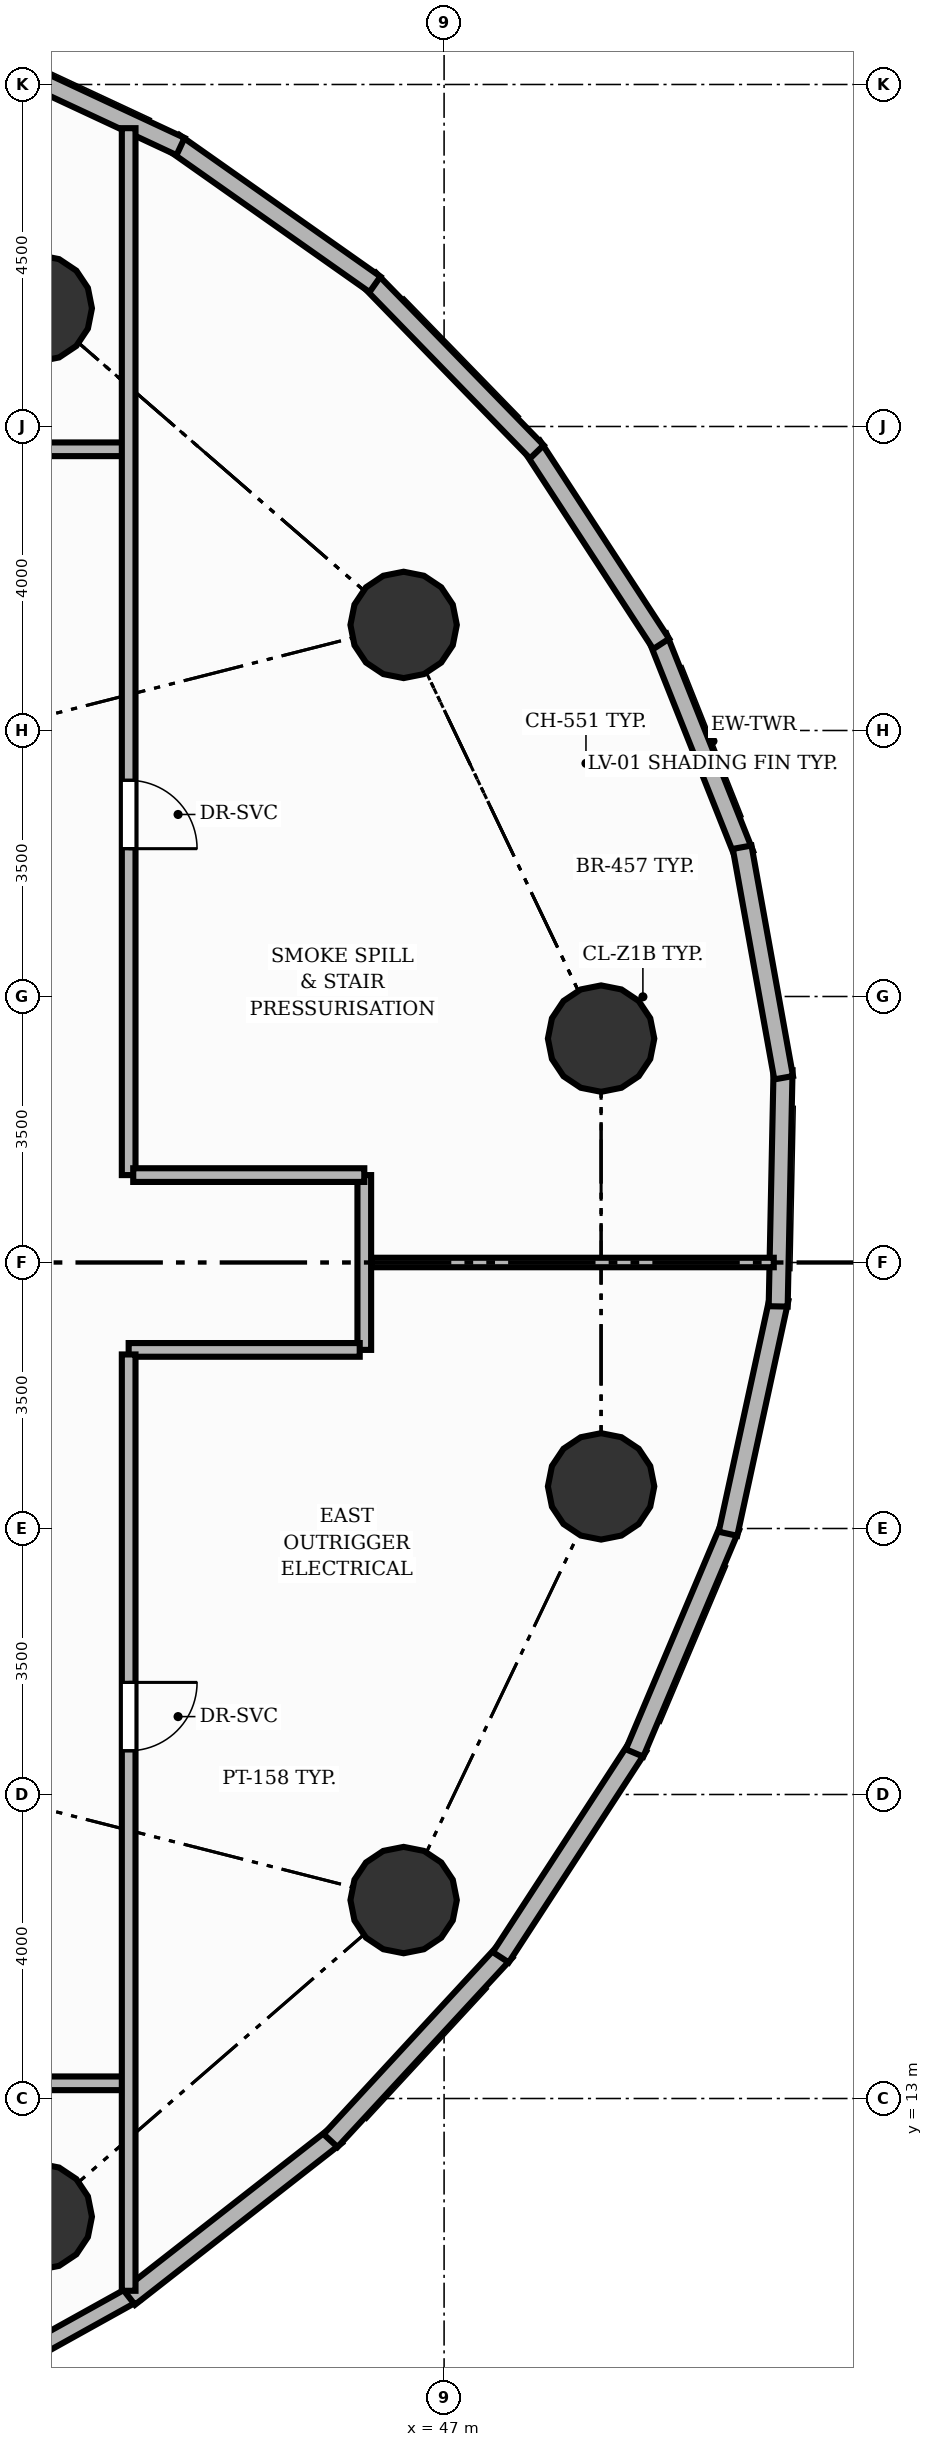
"""IFC4 building model, lengths in metres.
Left out: names, types, materials, properties, quantities, classifications, styles, units other than length and angle.
Written with IfcOpenShell. Run it as: python <this file> out.ifc"""

import sys

from ifc_helpers import new_model, si_unit, direction, frame, frame_2d, origin, origin_2d, place, context, subcontext, project, spatial, rectangle, circle, extrude, element, fill, save


model = new_model("IFC4")
c1 = context("Model", 3, precision=1e-05, world=origin(), true_north=direction((0.0, 1.0)))
c2 = subcontext(c1, "Body", "Model", "MODEL_VIEW")
j1 = project(units=[si_unit("LENGTHUNIT", "METRE"), si_unit("PLANEANGLEUNIT", "RADIAN")], contexts=[c1])
p1 = place(None, origin())
s1 = spatial("IfcSite", under=j1, at=p1, CompositionType="ELEMENT")
p2 = place(p1, origin())
s2 = spatial("IfcBuilding", under=s1, at=p2, CompositionType="ELEMENT")
p3 = place(p2, frame((0.0, 0.0, 66.4)))
s3 = spatial("IfcBuildingStorey", under=s2, at=p3, CompositionType="ELEMENT", Elevation=66.4)
for number, where, z_axis, x_axis in (
    (1, (49.066, 26.946, 0.0), (0.0, 0.0, 1.0), (1.0, 0.0, 0.0)),
    (2, (46.468, 32.389, 0.0), (0.0, 0.0, 1.0), (1.0, 0.0, 0.0)),
    (3, (41.667, 36.555, 0.0), (0.0, 0.0, 1.0), (1.0, 0.0, 0.0)),
    (4, (41.667, 11.445, 0.0), (0.0, 0.0, 1.0), (1.0, 0.0, 0.0)),
    (5, (46.468, 15.611, 0.0), (0.0, 0.0, 1.0), (1.0, 0.0, 0.0)),
    (6, (49.066, 21.054, 0.0), (0.0, 0.0, 1.0), (1.0, 0.0, 0.0)),
):
    element("IfcColumn", number, at=place(p3, frame(where, z_axis=z_axis, x_axis=x_axis)), inside=s3, PredefinedType="COLUMN", context=c2, shape_type="SweptSolid", body=[
        extrude(circle(Radius=0.7, at=origin_2d()), origin(), (0.0, 0.0, 1.0), 4.48),
    ])
p4 = place(p3, frame((49.809, 32.23, 0.0), z_axis=(0.0, 0.0, 1.0), x_axis=(0.369942469499, -0.929054664302, 0.0)))
e7 = element("IfcWall", 7, at=p4, inside=s3, PredefinedType="SOLIDWALL", context=c2, shape_type="SweptSolid", body=[
    extrude(rectangle(XDim=3.082, YDim=0.25, at=frame_2d((1.541, 0.0))), origin(), (0.0, 0.0, 1.0), 4.24),
])
p5 = place(p3, frame((48.157, 34.745, 0.0), z_axis=(0.0, 0.0, 1.0), x_axis=(0.546121725676, -0.837705831868, 0.0)))
e8 = element("IfcWall", 8, at=p5, inside=s3, PredefinedType="SOLIDWALL", context=c2, shape_type="SweptSolid", body=[
    extrude(rectangle(XDim=3.111, YDim=0.25, at=frame_2d((1.555, 0.0))), origin(), (0.0, 0.0, 1.0), 4.24),
])
p6 = place(p3, frame((46.015, 36.935, 0.0), z_axis=(0.0, 0.0, 1.0), x_axis=(0.697004563812, -0.717066690082, 0.0)))
e9 = element("IfcWall", 9, at=p6, inside=s3, PredefinedType="SOLIDWALL", context=c2, shape_type="SweptSolid", body=[
    extrude(rectangle(XDim=3.164, YDim=0.25, at=frame_2d((1.582, 0.0))), origin(), (0.0, 0.0, 1.0), 4.24),
])
p7 = place(p3, frame((43.447, 38.733, 0.0), z_axis=(0.0, 0.0, 1.0), x_axis=(0.817429926176, -0.576028051219, 0.0)))
e10 = element("IfcWall", 10, at=p7, inside=s3, PredefinedType="SOLIDWALL", context=c2, shape_type="SweptSolid", body=[
    extrude(rectangle(XDim=3.234, YDim=0.25, at=frame_2d((1.617, 0.0))), origin(), (0.0, 0.0, 1.0), 4.24),
])
p8 = place(p3, frame((40.531, 40.085, 0.0), z_axis=(0.0, 0.0, 1.0), x_axis=(0.906173725202, -0.422905639301, 0.0)))
e11 = element("IfcWall", 11, at=p8, inside=s3, PredefinedType="SOLIDWALL", context=c2, shape_type="SweptSolid", body=[
    extrude(rectangle(XDim=3.312, YDim=0.25, at=frame_2d((1.656, 0.0))), origin(), (0.0, 0.0, 1.0), 4.24),
])
p9 = place(p3, frame((42.937, 10.438, 0.0), z_axis=(0.0, 0.0, 1.0), x_axis=(-0.874075073274, -0.485790866815, 0.0)))
e12 = element("IfcWall", 12, at=p9, inside=s3, PredefinedType="PARAPET", context=c2, shape_type="SweptSolid", body=[
    extrude(rectangle(XDim=3.503, YDim=0.22, at=frame_2d((1.751, 0.0))), origin(), (0.0, 0.0, 1.0), 1.15),
])
p10 = place(p3, frame((45.578, 12.512, 0.0), z_axis=(0.0, 0.0, 1.0), x_axis=(-0.787892573834, -0.615812708619, 0.0)))
e13 = element("IfcWall", 13, at=p10, inside=s3, PredefinedType="SOLIDWALL", context=c2, shape_type="SweptSolid", body=[
    extrude(rectangle(XDim=3.455, YDim=0.25, at=frame_2d((1.727, 0.0))), origin(), (0.0, 0.0, 1.0), 4.24),
])
p11 = place(p3, frame((47.806, 14.936, 0.0), z_axis=(0.0, 0.0, 1.0), x_axis=(-0.678528400374, -0.734574169085, 0.0)))
e14 = element("IfcWall", 14, at=p11, inside=s3, PredefinedType="SOLIDWALL", context=c2, shape_type="SweptSolid", body=[
    extrude(rectangle(XDim=3.389, YDim=0.25, at=frame_2d((1.695, 0.0))), origin(), (0.0, 0.0, 1.0), 4.24),
])
p12 = place(p3, frame((49.552, 17.634, 0.0), z_axis=(0.0, 0.0, 1.0), x_axis=(-0.545464926113, -0.838133649474, 0.0)))
e15 = element("IfcWall", 15, at=p12, inside=s3, PredefinedType="SOLIDWALL", context=c2, shape_type="SweptSolid", body=[
    extrude(rectangle(XDim=3.312, YDim=0.25, at=frame_2d((1.656, 0.0))), origin(), (0.0, 0.0, 1.0), 4.24),
])
p13 = place(p3, frame((50.765, 20.526, 0.0), z_axis=(0.0, 0.0, 1.0), x_axis=(-0.389332172351, -0.921097421326, 0.0)))
e16 = element("IfcWall", 16, at=p13, inside=s3, PredefinedType="SOLIDWALL", context=c2, shape_type="SweptSolid", body=[
    extrude(rectangle(XDim=3.234, YDim=0.25, at=frame_2d((1.617, 0.0))), origin(), (0.0, 0.0, 1.0), 4.24),
])
p14 = place(p3, frame((51.407, 23.522, 0.0), z_axis=(0.0, 0.0, 1.0), x_axis=(-0.212426440862, -0.977177060324, 0.0)))
e17 = element("IfcWall", 17, at=p14, inside=s3, PredefinedType="SOLIDWALL", context=c2, shape_type="SweptSolid", body=[
    extrude(rectangle(XDim=3.164, YDim=0.25, at=frame_2d((1.582, 0.0))), origin(), (0.0, 0.0, 1.0), 4.24),
])
p15 = place(p3, frame((51.46, 26.532, 0.0), z_axis=(0.0, 0.0, 1.0), x_axis=(-0.020642483929, -0.999786921227, 0.0)))
e18 = element("IfcWall", 18, at=p15, inside=s3, PredefinedType="SOLIDWALL", context=c2, shape_type="SweptSolid", body=[
    extrude(rectangle(XDim=3.111, YDim=0.25, at=frame_2d((1.555, 0.0))), origin(), (0.0, 0.0, 1.0), 4.24),
])
p16 = place(p3, frame((50.921, 29.464, 0.0), z_axis=(0.0, 0.0, 1.0), x_axis=(0.17721899044, -0.984171443107, 0.0)))
e19 = element("IfcWall", 19, at=p16, inside=s3, PredefinedType="SOLIDWALL", context=c2, shape_type="SweptSolid", body=[
    extrude(rectangle(XDim=3.082, YDim=0.25, at=frame_2d((1.541, 0.0))), origin(), (0.0, 0.0, 1.0), 4.24),
])
p17 = place(p3, frame((42.85, 13.2, 0.0), z_axis=(0.0, 0.0, 1.0), x_axis=(-1.0, 0.0, 0.0)))
e20 = element("IfcWall", 20, at=p17, inside=s3, PredefinedType="PARTITIONING", context=c2, shape_type="SweptSolid", body=[
    extrude(rectangle(XDim=21.7, YDim=0.18, at=frame_2d((10.85, 0.0))), origin(), (0.0, 0.0, 1.0), 4.235),
])
p18 = place(p17, frame((10.4, 0.0, 0.0)))
e21 = element("IfcOpeningElement", 21, at=p18, cuts=e20, PredefinedType="OPENING", context=c2, shape_type="SweptSolid", body=[
    extrude(rectangle(XDim=0.9, YDim=2.1, at=frame_2d((0.45, 1.05))), frame((0.0, 0.1, 0.0), z_axis=(0.0, -1.0, 0.0), x_axis=(1.0, 0.0, 0.0)), (0.0, 0.0, 1.0), 0.2),
])
p19 = place(p3, frame((21.15, 34.7, 0.0), z_axis=(0.0, 0.0, 1.0), x_axis=(1.0, 0.0, 0.0)))
e22 = element("IfcWall", 22, at=p19, inside=s3, PredefinedType="PARTITIONING", context=c2, shape_type="SweptSolid", body=[
    extrude(rectangle(XDim=21.7, YDim=0.18, at=frame_2d((10.85, 0.0))), origin(), (0.0, 0.0, 1.0), 4.235),
])
p20 = place(p19, frame((15.715, 0.0, 0.0)))
e23 = element("IfcOpeningElement", 23, at=p20, cuts=e22, PredefinedType="OPENING", context=c2, shape_type="SweptSolid", body=[
    extrude(rectangle(XDim=0.9, YDim=2.1, at=frame_2d((0.45, 1.05))), frame((0.0, 0.1, 0.0), z_axis=(0.0, -1.0, 0.0), x_axis=(1.0, 0.0, 0.0)), (0.0, 0.0, 1.0), 0.2),
])
p21 = place(p19, frame((8.4, 0.0, 0.0)))
e24 = element("IfcOpeningElement", 24, at=p21, cuts=e22, PredefinedType="OPENING", context=c2, shape_type="SweptSolid", body=[
    extrude(rectangle(XDim=0.9, YDim=2.1, at=frame_2d((0.45, 1.05))), frame((0.0, 0.1, 0.0), z_axis=(0.0, -1.0, 0.0), x_axis=(1.0, 0.0, 0.0)), (0.0, 0.0, 1.0), 0.2),
])
p22 = place(p19, frame((3.085, 0.0, 0.0)))
e25 = element("IfcOpeningElement", 25, at=p22, cuts=e22, PredefinedType="OPENING", context=c2, shape_type="SweptSolid", body=[
    extrude(rectangle(XDim=0.9, YDim=2.1, at=frame_2d((0.45, 1.05))), frame((0.0, 0.1, 0.0), z_axis=(0.0, -1.0, 0.0), x_axis=(1.0, 0.0, 0.0)), (0.0, 0.0, 1.0), 0.2),
])
p23 = place(p3, frame((45.95, 25.15, 0.0), z_axis=(0.0, 0.0, 1.0), x_axis=(0.0, -1.0, 0.0)))
e26 = element("IfcWall", 26, at=p23, inside=s3, PredefinedType="PARTITIONING", context=c2, shape_type="SweptSolid", body=[
    extrude(rectangle(XDim=2.3, YDim=0.18, at=frame_2d((1.15, 0.0))), origin(), (0.0, 0.0, 1.0), 4.235),
])
p24 = place(p3, frame((45.89, 22.85, 0.0), z_axis=(0.0, 0.0, 1.0), x_axis=(-1.0, 0.0, 0.0)))
e27 = element("IfcWall", 27, at=p24, inside=s3, PredefinedType="PARTITIONING", context=c2, shape_type="SweptSolid", body=[
    extrude(rectangle(XDim=3.04, YDim=0.18, at=frame_2d((1.52, 0.0))), origin(), (0.0, 0.0, 1.0), 4.235),
])
p25 = place(p3, frame((42.85, 22.79, 0.0), z_axis=(0.0, 0.0, 1.0), x_axis=(0.0, -1.0, 0.0)))
e28 = element("IfcWall", 28, at=p25, inside=s3, PredefinedType="PARTITIONING", context=c2, shape_type="SweptSolid", body=[
    extrude(rectangle(XDim=12.32, YDim=0.18, at=frame_2d((6.16, 0.0))), origin(), (0.0, 0.0, 1.0), 4.235),
])
p26 = place(p25, frame((4.315, 0.0, 0.0)))
e29 = element("IfcOpeningElement", 29, at=p26, cuts=e28, PredefinedType="OPENING", context=c2, shape_type="SweptSolid", body=[
    extrude(rectangle(XDim=0.9, YDim=2.1, at=frame_2d((0.45, 1.05))), frame((0.0, 0.1, 0.0), z_axis=(0.0, -1.0, 0.0), x_axis=(1.0, 0.0, 0.0)), (0.0, 0.0, 1.0), 0.2),
])
p27 = place(p3, frame((42.85, 38.925, 0.0), z_axis=(0.0, 0.0, 1.0), x_axis=(0.0, -1.0, 0.0)))
e30 = element("IfcWall", 30, at=p27, inside=s3, PredefinedType="PARTITIONING", context=c2, shape_type="SweptSolid", body=[
    extrude(rectangle(XDim=13.775, YDim=0.18, at=frame_2d((6.888, 0.0))), origin(), (0.0, 0.0, 1.0), 4.235),
])
p28 = place(p27, frame((8.58, 0.0, 0.0)))
e31 = element("IfcOpeningElement", 31, at=p28, cuts=e30, PredefinedType="OPENING", context=c2, shape_type="SweptSolid", body=[
    extrude(rectangle(XDim=0.9, YDim=2.1, at=frame_2d((0.45, 1.05))), frame((0.0, 0.1, 0.0), z_axis=(0.0, -1.0, 0.0), x_axis=(1.0, 0.0, 0.0)), (0.0, 0.0, 1.0), 0.2),
])
p29 = place(p3, frame((42.91, 25.15, 0.0), z_axis=(0.0, 0.0, 1.0), x_axis=(1.0, 0.0, 0.0)))
e32 = element("IfcWall", 32, at=p29, inside=s3, PredefinedType="PARTITIONING", context=c2, shape_type="SweptSolid", body=[
    extrude(rectangle(XDim=3.04, YDim=0.18, at=frame_2d((1.52, 0.0))), origin(), (0.0, 0.0, 1.0), 4.235),
])
p30 = place(p3, frame((46.05, 24.0, 0.0), z_axis=(0.0, 0.0, 1.0), x_axis=(1.0, 0.0, 0.0)))
e33 = element("IfcWall", 33, at=p30, inside=s3, PredefinedType="PARTITIONING", context=c2, shape_type="SweptSolid", body=[
    extrude(rectangle(XDim=5.287, YDim=0.125, at=frame_2d((2.644, 0.0))), origin(), (0.0, 0.0, 1.0), 4.235),
])
p31 = place(p26, origin())
e34 = element("IfcDoor", 34, at=p31, inside=s3, OperationType="SINGLE_SWING_LEFT", PredefinedType="DOOR", context=c2, shape_type="SweptSolid", body=[
    extrude(rectangle(XDim=0.9, YDim=2.1, at=frame_2d((0.45, 1.05))), frame((0.0, 0.025, 0.0), z_axis=(0.0, -1.0, 0.0), x_axis=(1.0, 0.0, 0.0)), (0.0, 0.0, 1.0), 0.05),
])
fill(e29, e34)
p32 = place(p28, origin())
e35 = element("IfcDoor", 35, at=p32, inside=s3, OperationType="SINGLE_SWING_RIGHT", PredefinedType="DOOR", context=c2, shape_type="SweptSolid", body=[
    extrude(rectangle(XDim=0.9, YDim=2.1, at=frame_2d((0.45, 1.05))), frame((0.0, 0.025, 0.0), z_axis=(0.0, -1.0, 0.0), x_axis=(1.0, 0.0, 0.0)), (0.0, 0.0, 1.0), 0.05),
])
fill(e31, e35)
save(model, sys.argv[1])
